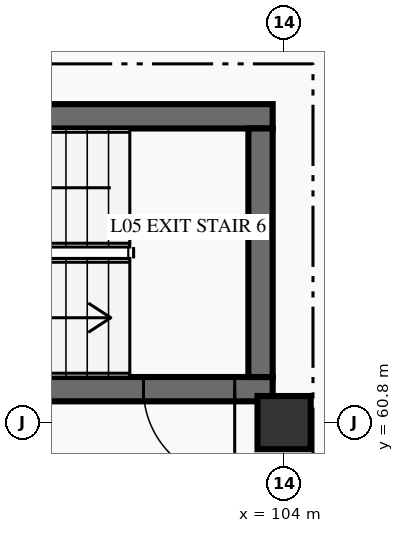
"""IFC4 building model, lengths in metres.
Left out: names, types, materials, properties, quantities, classifications, styles, units other than length and angle.
Written with IfcOpenShell. Run it as: python <this file> out.ifc"""

import sys

from ifc_helpers import new_model, si_unit, direction, frame, frame_2d, origin, origin_2d, place, context, subcontext, project, spatial, rectangle, extrude, element, fill, save


model = new_model("IFC4")
c1 = context("Model", 3, precision=1e-05, world=origin(), true_north=direction((0.0, 1.0)))
c2 = subcontext(c1, "Body", "Model", "MODEL_VIEW")
j1 = project(units=[si_unit("LENGTHUNIT", "METRE"), si_unit("PLANEANGLEUNIT", "RADIAN")], contexts=[c1])
p1 = place(None, origin())
s1 = spatial("IfcSite", under=j1, at=p1, CompositionType="ELEMENT")
p2 = place(p1, origin())
s2 = spatial("IfcBuilding", under=s1, at=p2, CompositionType="ELEMENT")
p3 = place(p2, frame((0.0, 0.0, 18.9)))
s3 = spatial("IfcBuildingStorey", under=s2, at=p3, CompositionType="ELEMENT", Elevation=18.9)
p4 = place(p3, frame((104.0, 60.8, 0.0), z_axis=(0.0, 0.0, 1.0), x_axis=(1.0, 0.0, 0.0)))
e1 = element("IfcColumn", 1, at=p4, inside=s3, PredefinedType="COLUMN", context=c2, shape_type="SweptSolid", body=[
    extrude(rectangle(XDim=0.7, YDim=0.7, at=origin_2d()), origin(), (0.0, 0.0, 1.0), 4.8),
])
p5 = place(p3, frame((103.85, 61.24, 0.0), z_axis=(0.0, 0.0, 1.0), x_axis=(-1.0, 0.0, 0.0)))
e2 = element("IfcWall", 2, at=p5, inside=s3, PredefinedType="SHEAR", context=c2, shape_type="SweptSolid", body=[
    extrude(rectangle(XDim=7.7, YDim=0.32, at=frame_2d((3.85, 0.0))), origin(), (0.0, 0.0, 1.0), 4.8),
])
p6 = place(p5, frame((0.5, 0.0, 0.0)))
e3 = element("IfcOpeningElement", 3, at=p6, cuts=e2, PredefinedType="OPENING", context=c2, shape_type="SweptSolid", body=[
    extrude(rectangle(XDim=1.2, YDim=2.2, at=frame_2d((0.6, 1.1))), frame((0.0, 0.17, 0.0), z_axis=(0.0, -1.0, 0.0), x_axis=(1.0, 0.0, 0.0)), (0.0, 0.0, 1.0), 0.34),
])
p7 = place(p3, frame((96.15, 64.83, 0.0), z_axis=(0.0, 0.0, 1.0), x_axis=(1.0, 0.0, 0.0)))
e4 = element("IfcWall", 4, at=p7, inside=s3, PredefinedType="SHEAR", context=c2, shape_type="SweptSolid", body=[
    extrude(rectangle(XDim=7.7, YDim=0.32, at=frame_2d((3.85, 0.0))), origin(), (0.0, 0.0, 1.0), 4.8),
])
p8 = place(p3, frame((103.69, 64.67, 0.0), z_axis=(0.0, 0.0, 1.0), x_axis=(0.0, -1.0, 0.0)))
e5 = element("IfcWall", 5, at=p8, inside=s3, PredefinedType="SHEAR", context=c2, shape_type="SweptSolid", body=[
    extrude(rectangle(XDim=3.27, YDim=0.32, at=frame_2d((1.635, 0.0))), origin(), (0.0, 0.0, 1.0), 4.8),
])
p9 = place(p6, origin())
e6 = element("IfcDoor", 6, at=p9, inside=s3, OperationType="SINGLE_SWING_LEFT", PredefinedType="DOOR", context=c2, shape_type="SweptSolid", body=[
    extrude(rectangle(XDim=1.2, YDim=2.2, at=frame_2d((0.6, 1.1))), frame((0.0, 0.025, 0.0), z_axis=(0.0, -1.0, 0.0), x_axis=(1.0, 0.0, 0.0)), (0.0, 0.0, 1.0), 0.05),
])
fill(e3, e6)
save(model, sys.argv[1])
